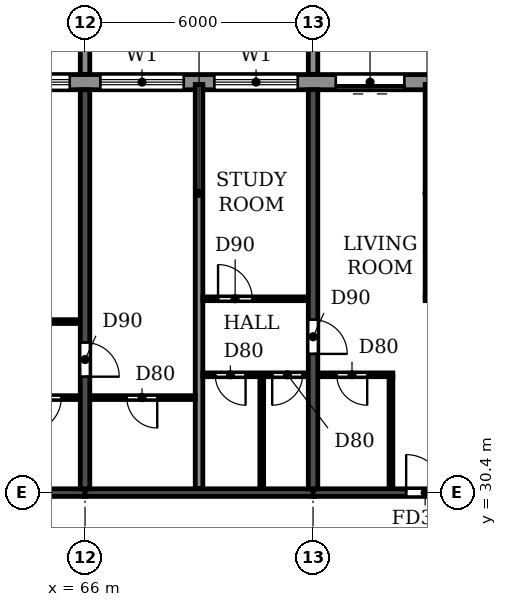
"""IFC4 building model, lengths in metres.
Left out: names, types, materials, properties, quantities, classifications, styles, units other than length and angle.
Written with IfcOpenShell. Run it as: python <this file> out.ifc"""

import sys

from ifc_helpers import new_model, si_unit, direction, frame, frame_2d, origin, place, context, subcontext, project, spatial, polyline, rectangle, outline, extrude, source, transform, mapped, element, fill, save


model = new_model("IFC4")
c1 = context("Model", 3, precision=1e-05, world=origin(), true_north=direction((0.0, 1.0)))
c2 = subcontext(c1, "Body", "Model", "MODEL_VIEW")
j1 = project(units=[si_unit("LENGTHUNIT", "METRE"), si_unit("PLANEANGLEUNIT", "RADIAN")], contexts=[c1])
p1 = place(None, origin())
s1 = spatial("IfcSite", under=j1, at=p1, CompositionType="ELEMENT")
p2 = place(p1, origin())
s2 = spatial("IfcBuilding", under=s1, at=p2, CompositionType="ELEMENT")
p3 = place(p2, frame((0.0, 0.0, 201.6)))
s3 = spatial("IfcBuildingStorey", under=s2, at=p3, CompositionType="ELEMENT", Elevation=201.6)
p4 = place(p3, frame((66.0, 30.5, 0.0), z_axis=(0.0, 0.0, 1.0), x_axis=(0.0, 1.0, 0.0)))
e1 = element("IfcWall", 1, at=p4, inside=s3, PredefinedType="SHEAR", context=c2, shape_type="SweptSolid", body=[
    extrude(rectangle(XDim=10.5, YDim=0.25, at=frame_2d((5.25, 0.0))), origin(), (0.0, 0.0, 1.0), 3.08),
])
p5 = place(p4, frame((2.95, 0.0, 0.0)))
e2 = element("IfcOpeningElement", 2, at=p5, cuts=e1, PredefinedType="OPENING", context=c2, shape_type="SweptSolid", body=[
    extrude(rectangle(XDim=0.9, YDim=2.1, at=frame_2d((0.45, 1.05))), frame((0.0, 0.135, 0.0), z_axis=(0.0, -1.0, 0.0), x_axis=(1.0, 0.0, 0.0)), (0.0, 0.0, 1.0), 0.27),
])
p6 = place(p3, frame((72.0, 30.5, 0.0), z_axis=(0.0, 0.0, 1.0), x_axis=(0.0, 1.0, 0.0)))
e3 = element("IfcWall", 3, at=p6, inside=s3, PredefinedType="SHEAR", context=c2, shape_type="SweptSolid", body=[
    extrude(rectangle(XDim=10.5, YDim=0.25, at=frame_2d((5.25, 0.0))), origin(), (0.0, 0.0, 1.0), 3.08),
])
p7 = place(p6, frame((3.55, 0.0, 0.0)))
e4 = element("IfcOpeningElement", 4, at=p7, cuts=e3, PredefinedType="OPENING", context=c2, shape_type="SweptSolid", body=[
    extrude(rectangle(XDim=0.9, YDim=2.1, at=frame_2d((0.45, 1.05))), frame((0.0, 0.135, 0.0), z_axis=(0.0, -1.0, 0.0), x_axis=(1.0, 0.0, 0.0)), (0.0, 0.0, 1.0), 0.27),
])
p8 = place(p3, frame((60.0, 30.4, 0.0), z_axis=(0.0, 0.0, 1.0), x_axis=(1.0, 0.0, 0.0)))
e5 = element("IfcWall", 5, at=p8, inside=s3, PredefinedType="SHEAR", context=c2, shape_type="SweptSolid", body=[
    extrude(rectangle(XDim=6.0, YDim=0.2, at=frame_2d((3.0, 0.0))), origin(), (0.0, 0.0, 1.0), 2.48),
])
p9 = place(p8, frame((2.45, 0.0, 0.0)))
e6 = element("IfcOpeningElement", 6, at=p9, cuts=e5, PredefinedType="OPENING", context=c2, shape_type="SweptSolid", body=[
    extrude(rectangle(XDim=1.0, YDim=2.1, at=frame_2d((0.5, 1.05))), frame((0.0, 0.11, 0.0), z_axis=(0.0, -1.0, 0.0), x_axis=(1.0, 0.0, 0.0)), (0.0, 0.0, 1.0), 0.22),
])
p10 = place(p3, frame((66.0, 30.4, 0.0), z_axis=(0.0, 0.0, 1.0), x_axis=(1.0, 0.0, 0.0)))
e7 = element("IfcWall", 7, at=p10, inside=s3, PredefinedType="SHEAR", context=c2, shape_type="SweptSolid", body=[
    extrude(rectangle(XDim=6.0, YDim=0.2, at=frame_2d((3.0, 0.0))), origin(), (0.0, 0.0, 1.0), 2.48),
])
p11 = place(p3, frame((72.0, 30.4, 0.0), z_axis=(0.0, 0.0, 1.0), x_axis=(1.0, 0.0, 0.0)))
e8 = element("IfcWall", 8, at=p11, inside=s3, PredefinedType="SHEAR", context=c2, shape_type="SweptSolid", body=[
    extrude(rectangle(XDim=6.0, YDim=0.2, at=frame_2d((3.0, 0.0))), origin(), (0.0, 0.0, 1.0), 2.48),
])
p12 = place(p11, frame((2.45, 0.0, 0.0)))
e9 = element("IfcOpeningElement", 9, at=p12, cuts=e8, PredefinedType="OPENING", context=c2, shape_type="SweptSolid", body=[
    extrude(rectangle(XDim=1.0, YDim=2.1, at=frame_2d((0.5, 1.05))), frame((0.0, 0.11, 0.0), z_axis=(0.0, -1.0, 0.0), x_axis=(1.0, 0.0, 0.0)), (0.0, 0.0, 1.0), 0.22),
])
p13 = place(p3, frame((79.317, 41.2, 0.0), z_axis=(0.0, 0.0, 1.0), x_axis=(-1.0, 0.0, 0.0)))
e10 = element("IfcWall", 10, at=p13, inside=s3, PredefinedType="STANDARD", context=c2, shape_type="SweptSolid", body=[
    extrude(rectangle(XDim=56.634, YDim=0.4, at=frame_2d((28.317, 0.0))), origin(), (0.0, 0.0, 1.0), 3.08),
])
p14 = place(p13, frame((52.717, 0.0, 0.9)))
e11 = element("IfcOpeningElement", 11, at=p14, cuts=e10, PredefinedType="OPENING", context=c2, shape_type="SweptSolid", body=[
    extrude(rectangle(XDim=2.2, YDim=1.5, at=frame_2d((1.1, 0.75))), frame((0.0, 0.21, 0.0), z_axis=(0.0, -1.0, 0.0), x_axis=(1.0, 0.0, 0.0)), (0.0, 0.0, 1.0), 0.42),
])
p15 = place(p13, frame((49.917, 0.0, 0.0)))
e12 = element("IfcOpeningElement", 12, at=p15, cuts=e10, PredefinedType="OPENING", context=c2, shape_type="SweptSolid", body=[
    extrude(rectangle(XDim=1.8, YDim=2.4, at=frame_2d((0.9, 1.2))), frame((0.0, 0.21, 0.0), z_axis=(0.0, -1.0, 0.0), x_axis=(1.0, 0.0, 0.0)), (0.0, 0.0, 1.0), 0.42),
])
p16 = place(p13, frame((46.717, 0.0, 0.9)))
e13 = element("IfcOpeningElement", 13, at=p16, cuts=e10, PredefinedType="OPENING", context=c2, shape_type="SweptSolid", body=[
    extrude(rectangle(XDim=2.2, YDim=1.5, at=frame_2d((1.1, 0.75))), frame((0.0, 0.21, 0.0), z_axis=(0.0, -1.0, 0.0), x_axis=(1.0, 0.0, 0.0)), (0.0, 0.0, 1.0), 0.42),
])
p17 = place(p13, frame((43.917, 0.0, 0.0)))
e14 = element("IfcOpeningElement", 14, at=p17, cuts=e10, PredefinedType="OPENING", context=c2, shape_type="SweptSolid", body=[
    extrude(rectangle(XDim=1.8, YDim=2.4, at=frame_2d((0.9, 1.2))), frame((0.0, 0.21, 0.0), z_axis=(0.0, -1.0, 0.0), x_axis=(1.0, 0.0, 0.0)), (0.0, 0.0, 1.0), 0.42),
])
p18 = place(p13, frame((40.917, 0.0, 0.0)))
e15 = element("IfcOpeningElement", 15, at=p18, cuts=e10, PredefinedType="OPENING", context=c2, shape_type="SweptSolid", body=[
    extrude(rectangle(XDim=1.8, YDim=2.4, at=frame_2d((0.9, 1.2))), frame((0.0, 0.21, 0.0), z_axis=(0.0, -1.0, 0.0), x_axis=(1.0, 0.0, 0.0)), (0.0, 0.0, 1.0), 0.42),
])
p19 = place(p13, frame((37.717, 0.0, 0.9)))
e16 = element("IfcOpeningElement", 16, at=p19, cuts=e10, PredefinedType="OPENING", context=c2, shape_type="SweptSolid", body=[
    extrude(rectangle(XDim=2.2, YDim=1.5, at=frame_2d((1.1, 0.75))), frame((0.0, 0.21, 0.0), z_axis=(0.0, -1.0, 0.0), x_axis=(1.0, 0.0, 0.0)), (0.0, 0.0, 1.0), 0.42),
])
p20 = place(p13, frame((34.717, 0.0, 0.9)))
e17 = element("IfcOpeningElement", 17, at=p20, cuts=e10, PredefinedType="OPENING", context=c2, shape_type="SweptSolid", body=[
    extrude(rectangle(XDim=2.2, YDim=1.5, at=frame_2d((1.1, 0.75))), frame((0.0, 0.21, 0.0), z_axis=(0.0, -1.0, 0.0), x_axis=(1.0, 0.0, 0.0)), (0.0, 0.0, 1.0), 0.42),
])
p21 = place(p13, frame((31.717, 0.0, 0.9)))
e18 = element("IfcOpeningElement", 18, at=p21, cuts=e10, PredefinedType="OPENING", context=c2, shape_type="SweptSolid", body=[
    extrude(rectangle(XDim=2.2, YDim=1.5, at=frame_2d((1.1, 0.75))), frame((0.0, 0.21, 0.0), z_axis=(0.0, -1.0, 0.0), x_axis=(1.0, 0.0, 0.0)), (0.0, 0.0, 1.0), 0.42),
])
p22 = place(p13, frame((28.717, 0.0, 0.9)))
e19 = element("IfcOpeningElement", 19, at=p22, cuts=e10, PredefinedType="OPENING", context=c2, shape_type="SweptSolid", body=[
    extrude(rectangle(XDim=2.2, YDim=1.5, at=frame_2d((1.1, 0.75))), frame((0.0, 0.21, 0.0), z_axis=(0.0, -1.0, 0.0), x_axis=(1.0, 0.0, 0.0)), (0.0, 0.0, 1.0), 0.42),
])
p23 = place(p13, frame((25.917, 0.0, 0.0)))
e20 = element("IfcOpeningElement", 20, at=p23, cuts=e10, PredefinedType="OPENING", context=c2, shape_type="SweptSolid", body=[
    extrude(rectangle(XDim=1.8, YDim=2.4, at=frame_2d((0.9, 1.2))), frame((0.0, 0.21, 0.0), z_axis=(0.0, -1.0, 0.0), x_axis=(1.0, 0.0, 0.0)), (0.0, 0.0, 1.0), 0.42),
])
p24 = place(p13, frame((22.717, 0.0, 0.9)))
e21 = element("IfcOpeningElement", 21, at=p24, cuts=e10, PredefinedType="OPENING", context=c2, shape_type="SweptSolid", body=[
    extrude(rectangle(XDim=2.2, YDim=1.5, at=frame_2d((1.1, 0.75))), frame((0.0, 0.21, 0.0), z_axis=(0.0, -1.0, 0.0), x_axis=(1.0, 0.0, 0.0)), (0.0, 0.0, 1.0), 0.42),
])
p25 = place(p13, frame((19.717, 0.0, 0.9)))
e22 = element("IfcOpeningElement", 22, at=p25, cuts=e10, PredefinedType="OPENING", context=c2, shape_type="SweptSolid", body=[
    extrude(rectangle(XDim=2.2, YDim=1.5, at=frame_2d((1.1, 0.75))), frame((0.0, 0.21, 0.0), z_axis=(0.0, -1.0, 0.0), x_axis=(1.0, 0.0, 0.0)), (0.0, 0.0, 1.0), 0.42),
])
p26 = place(p13, frame((16.917, 0.0, 0.0)))
e23 = element("IfcOpeningElement", 23, at=p26, cuts=e10, PredefinedType="OPENING", context=c2, shape_type="SweptSolid", body=[
    extrude(rectangle(XDim=1.8, YDim=2.4, at=frame_2d((0.9, 1.2))), frame((0.0, 0.21, 0.0), z_axis=(0.0, -1.0, 0.0), x_axis=(1.0, 0.0, 0.0)), (0.0, 0.0, 1.0), 0.42),
])
p27 = place(p13, frame((13.717, 0.0, 0.9)))
e24 = element("IfcOpeningElement", 24, at=p27, cuts=e10, PredefinedType="OPENING", context=c2, shape_type="SweptSolid", body=[
    extrude(rectangle(XDim=2.2, YDim=1.5, at=frame_2d((1.1, 0.75))), frame((0.0, 0.21, 0.0), z_axis=(0.0, -1.0, 0.0), x_axis=(1.0, 0.0, 0.0)), (0.0, 0.0, 1.0), 0.42),
])
p28 = place(p13, frame((10.717, 0.0, 0.9)))
e25 = element("IfcOpeningElement", 25, at=p28, cuts=e10, PredefinedType="OPENING", context=c2, shape_type="SweptSolid", body=[
    extrude(rectangle(XDim=2.2, YDim=1.5, at=frame_2d((1.1, 0.75))), frame((0.0, 0.21, 0.0), z_axis=(0.0, -1.0, 0.0), x_axis=(1.0, 0.0, 0.0)), (0.0, 0.0, 1.0), 0.42),
])
p29 = place(p13, frame((7.717, 0.0, 0.9)))
e26 = element("IfcOpeningElement", 26, at=p29, cuts=e10, PredefinedType="OPENING", context=c2, shape_type="SweptSolid", body=[
    extrude(rectangle(XDim=2.2, YDim=1.5, at=frame_2d((1.1, 0.75))), frame((0.0, 0.21, 0.0), z_axis=(0.0, -1.0, 0.0), x_axis=(1.0, 0.0, 0.0)), (0.0, 0.0, 1.0), 0.42),
])
p30 = place(p13, frame((4.917, 0.0, 0.0)))
e27 = element("IfcOpeningElement", 27, at=p30, cuts=e10, PredefinedType="OPENING", context=c2, shape_type="SweptSolid", body=[
    extrude(rectangle(XDim=1.8, YDim=2.4, at=frame_2d((0.9, 1.2))), frame((0.0, 0.21, 0.0), z_axis=(0.0, -1.0, 0.0), x_axis=(1.0, 0.0, 0.0)), (0.0, 0.0, 1.0), 0.42),
])
p31 = place(p13, frame((1.717, 0.0, 0.9)))
e28 = element("IfcOpeningElement", 28, at=p31, cuts=e10, PredefinedType="OPENING", context=c2, shape_type="SweptSolid", body=[
    extrude(rectangle(XDim=2.2, YDim=1.5, at=frame_2d((1.1, 0.75))), frame((0.0, 0.21, 0.0), z_axis=(0.0, -1.0, 0.0), x_axis=(1.0, 0.0, 0.0)), (0.0, 0.0, 1.0), 0.42),
])
m1 = source(origin(), c2, "Body", "SweptSolid", [
    extrude(outline(polyline([(0.0, 0.0), (0.25, 0.0), (0.25, 3.1), (0.0, 3.1), (0.0, 0.0)])), origin(), (0.0, 0.0, 1.0), 3.1),
])
for number, where in (
    (29, (65.875, 41.4, 0.0)),
    (30, (71.875, 41.4, 0.0)),
):
    element("IfcWall", number, at=place(p3, frame(where)), inside=s3, PredefinedType="STANDARD", context=c2, shape_type="MappedRepresentation", body=[
        mapped(m1, transform((0.0, 0.0, 0.0))),
    ])
p32 = place(p3, frame((69.0, 30.51, 0.0), z_axis=(0.0, 0.0, 1.0), x_axis=(0.0, 1.0, 0.0)))
e31 = element("IfcWall", 31, at=p32, inside=s3, PredefinedType="PARTITIONING", context=c2, shape_type="SweptSolid", body=[
    extrude(rectangle(XDim=10.63, YDim=0.2, at=frame_2d((5.315, 0.0))), origin(), (0.0, 0.0, 1.0), 3.08),
])
p33 = place(p3, frame((63.8, 32.9, 0.0), z_axis=(0.0, 0.0, 1.0), x_axis=(1.0, 0.0, 0.0)))
e32 = element("IfcWall", 32, at=p33, inside=s3, PredefinedType="PARTITIONING", context=c2, shape_type="SweptSolid", body=[
    extrude(rectangle(XDim=2.065, YDim=0.1, at=frame_2d((1.032, 0.0))), origin(), (0.0, 0.0, 1.0), 3.08),
])
p34 = place(p33, frame((0.675, 0.0, 0.0)))
e33 = element("IfcOpeningElement", 33, at=p34, cuts=e32, PredefinedType="OPENING", context=c2, shape_type="SweptSolid", body=[
    extrude(rectangle(XDim=0.9, YDim=2.1, at=frame_2d((0.45, 1.05))), frame((0.0, 0.06, 0.0), z_axis=(0.0, -1.0, 0.0), x_axis=(1.0, 0.0, 0.0)), (0.0, 0.0, 1.0), 0.12),
])
p35 = place(p3, frame((66.135, 32.9, 0.0), z_axis=(0.0, 0.0, 1.0), x_axis=(1.0, 0.0, 0.0)))
e34 = element("IfcWall", 34, at=p35, inside=s3, PredefinedType="PARTITIONING", context=c2, shape_type="SweptSolid", body=[
    extrude(rectangle(XDim=2.765, YDim=0.1, at=frame_2d((1.382, 0.0))), origin(), (0.0, 0.0, 1.0), 3.08),
])
p36 = place(p35, frame((0.965, 0.0, 0.0)))
e35 = element("IfcOpeningElement", 35, at=p36, cuts=e34, PredefinedType="OPENING", context=c2, shape_type="SweptSolid", body=[
    extrude(rectangle(XDim=0.8, YDim=2.1, at=frame_2d((0.4, 1.05))), frame((0.0, 0.06, 0.0), z_axis=(0.0, -1.0, 0.0), x_axis=(1.0, 0.0, 0.0)), (0.0, 0.0, 1.0), 0.12),
])
p37 = place(p3, frame((69.1, 33.5, 0.0), z_axis=(0.0, 0.0, 1.0), x_axis=(1.0, 0.0, 0.0)))
e36 = element("IfcWall", 36, at=p37, inside=s3, PredefinedType="PARTITIONING", context=c2, shape_type="SweptSolid", body=[
    extrude(rectangle(XDim=2.765, YDim=0.1, at=frame_2d((1.382, 0.0))), origin(), (0.0, 0.0, 1.0), 3.08),
])
p38 = place(p37, frame((0.325, 0.0, 0.0)))
e37 = element("IfcOpeningElement", 37, at=p38, cuts=e36, PredefinedType="OPENING", context=c2, shape_type="SweptSolid", body=[
    extrude(rectangle(XDim=0.8, YDim=2.1, at=frame_2d((0.4, 1.05))), frame((0.0, 0.06, 0.0), z_axis=(0.0, -1.0, 0.0), x_axis=(1.0, 0.0, 0.0)), (0.0, 0.0, 1.0), 0.12),
])
p39 = place(p37, frame((1.825, 0.0, 0.0)))
e38 = element("IfcOpeningElement", 38, at=p39, cuts=e36, PredefinedType="OPENING", context=c2, shape_type="SweptSolid", body=[
    extrude(rectangle(XDim=0.8, YDim=2.1, at=frame_2d((0.4, 1.05))), frame((0.0, 0.06, 0.0), z_axis=(0.0, -1.0, 0.0), x_axis=(1.0, 0.0, 0.0)), (0.0, 0.0, 1.0), 0.12),
])
p40 = place(p3, frame((72.135, 33.5, 0.0), z_axis=(0.0, 0.0, 1.0), x_axis=(1.0, 0.0, 0.0)))
e39 = element("IfcWall", 39, at=p40, inside=s3, PredefinedType="PARTITIONING", context=c2, shape_type="SweptSolid", body=[
    extrude(rectangle(XDim=1.965, YDim=0.1, at=frame_2d((0.982, 0.0))), origin(), (0.0, 0.0, 1.0), 3.08),
])
p41 = place(p40, frame((0.49, 0.0, 0.0)))
e40 = element("IfcOpeningElement", 40, at=p41, cuts=e39, PredefinedType="OPENING", context=c2, shape_type="SweptSolid", body=[
    extrude(rectangle(XDim=0.8, YDim=2.1, at=frame_2d((0.4, 1.05))), frame((0.0, 0.06, 0.0), z_axis=(0.0, -1.0, 0.0), x_axis=(1.0, 0.0, 0.0)), (0.0, 0.0, 1.0), 0.12),
])
p42 = place(p3, frame((62.95, 34.9, 0.0), z_axis=(0.0, 0.0, 1.0), x_axis=(1.0, 0.0, 0.0)))
e41 = element("IfcWall", 41, at=p42, inside=s3, PredefinedType="PARTITIONING", context=c2, shape_type="SweptSolid", body=[
    extrude(rectangle(XDim=2.915, YDim=0.1, at=frame_2d((1.458, 0.0))), origin(), (0.0, 0.0, 1.0), 3.08),
])
p43 = place(p42, frame((0.55, 0.0, 0.0)))
e42 = element("IfcOpeningElement", 42, at=p43, cuts=e41, PredefinedType="OPENING", context=c2, shape_type="SweptSolid", body=[
    extrude(rectangle(XDim=0.9, YDim=2.1, at=frame_2d((0.45, 1.05))), frame((0.0, 0.06, 0.0), z_axis=(0.0, -1.0, 0.0), x_axis=(1.0, 0.0, 0.0)), (0.0, 0.0, 1.0), 0.12),
])
p44 = place(p3, frame((69.1, 35.5, 0.0), z_axis=(0.0, 0.0, 1.0), x_axis=(1.0, 0.0, 0.0)))
e43 = element("IfcWall", 43, at=p44, inside=s3, PredefinedType="PARTITIONING", context=c2, shape_type="SweptSolid", body=[
    extrude(rectangle(XDim=2.765, YDim=0.1, at=frame_2d((1.382, 0.0))), origin(), (0.0, 0.0, 1.0), 3.08),
])
p45 = place(p44, frame((0.4, 0.0, 0.0)))
e44 = element("IfcOpeningElement", 44, at=p45, cuts=e43, PredefinedType="OPENING", context=c2, shape_type="SweptSolid", body=[
    extrude(rectangle(XDim=0.9, YDim=2.1, at=frame_2d((0.45, 1.05))), frame((0.0, 0.06, 0.0), z_axis=(0.0, -1.0, 0.0), x_axis=(1.0, 0.0, 0.0)), (0.0, 0.0, 1.0), 0.12),
])
p46 = place(p3, frame((74.95, 35.5, 0.0), z_axis=(0.0, 0.0, 1.0), x_axis=(1.0, 0.0, 0.0)))
e45 = element("IfcWall", 45, at=p46, inside=s3, PredefinedType="PARTITIONING", context=c2, shape_type="SweptSolid", body=[
    extrude(rectangle(XDim=2.915, YDim=0.1, at=frame_2d((1.458, 0.0))), origin(), (0.0, 0.0, 1.0), 3.08),
])
p47 = place(p46, frame((0.55, 0.0, 0.0)))
e46 = element("IfcOpeningElement", 46, at=p47, cuts=e45, PredefinedType="OPENING", context=c2, shape_type="SweptSolid", body=[
    extrude(rectangle(XDim=0.9, YDim=2.1, at=frame_2d((0.45, 1.05))), frame((0.0, 0.06, 0.0), z_axis=(0.0, -1.0, 0.0), x_axis=(1.0, 0.0, 0.0)), (0.0, 0.0, 1.0), 0.12),
])
for number, where, z_axis, x_axis in (
    (47, (70.65, 30.51, 0.0), (0.0, 0.0, 1.0), (0.0, 1.0, 0.0)),
    (48, (74.05, 30.51, 0.0), (0.0, 0.0, 1.0), (0.0, 1.0, 0.0)),
):
    element("IfcWall", number, at=place(p3, frame(where, z_axis=z_axis, x_axis=x_axis)), inside=s3, PredefinedType="PARTITIONING", context=c2, shape_type="SweptSolid", body=[
        extrude(rectangle(XDim=2.94, YDim=0.1, at=frame_2d((1.47, 0.0))), origin(), (0.0, 0.0, 1.0), 3.08),
    ])
p48 = place(p3, frame((75.0, 35.55, 0.0), z_axis=(0.0, 0.0, 1.0), x_axis=(0.0, 1.0, 0.0)))
e49 = element("IfcWall", 49, at=p48, inside=s3, PredefinedType="PARTITIONING", context=c2, shape_type="SweptSolid", body=[
    extrude(rectangle(XDim=5.59, YDim=0.1, at=frame_2d((2.795, 0.0))), origin(), (0.0, 0.0, 1.0), 3.08),
])
p49 = place(p27, origin())
e50 = element("IfcWindow", 50, at=p49, inside=s3, PartitioningType="DOUBLE_PANEL_HORIZONTAL", PredefinedType="WINDOW", context=c2, shape_type="SweptSolid", body=[
    extrude(rectangle(XDim=2.2, YDim=1.5, at=frame_2d((1.1, 0.75))), frame((0.0, 0.03, 0.0), z_axis=(0.0, -1.0, 0.0), x_axis=(1.0, 0.0, 0.0)), (0.0, 0.0, 1.0), 0.06),
])
fill(e24, e50)
p50 = place(p28, origin())
e51 = element("IfcWindow", 51, at=p50, inside=s3, PartitioningType="DOUBLE_PANEL_HORIZONTAL", PredefinedType="WINDOW", context=c2, shape_type="SweptSolid", body=[
    extrude(rectangle(XDim=2.2, YDim=1.5, at=frame_2d((1.1, 0.75))), frame((0.0, 0.03, 0.0), z_axis=(0.0, -1.0, 0.0), x_axis=(1.0, 0.0, 0.0)), (0.0, 0.0, 1.0), 0.06),
])
fill(e25, e51)
p51 = place(p29, origin())
e52 = element("IfcWindow", 52, at=p51, inside=s3, PartitioningType="DOUBLE_PANEL_HORIZONTAL", PredefinedType="WINDOW", context=c2, shape_type="SweptSolid", body=[
    extrude(rectangle(XDim=2.2, YDim=1.5, at=frame_2d((1.1, 0.75))), frame((0.0, 0.03, 0.0), z_axis=(0.0, -1.0, 0.0), x_axis=(1.0, 0.0, 0.0)), (0.0, 0.0, 1.0), 0.06),
])
fill(e26, e52)
p52 = place(p30, origin())
e53 = element("IfcDoor", 53, at=p52, inside=s3, OperationType="DOUBLE_DOOR_SLIDING", PredefinedType="DOOR", context=c2, shape_type="SweptSolid", body=[
    extrude(rectangle(XDim=1.8, YDim=2.4, at=frame_2d((0.9, 1.2))), frame((0.0, 0.025, 0.0), z_axis=(0.0, -1.0, 0.0), x_axis=(1.0, 0.0, 0.0)), (0.0, 0.0, 1.0), 0.05),
])
fill(e27, e53)
p53 = place(p36, frame((0.8, 0.0, 0.0), z_axis=(0.0, 0.0, 1.0), x_axis=(-1.0, 0.0, 0.0)))
e54 = element("IfcDoor", 54, at=p53, inside=s3, OperationType="SINGLE_SWING_LEFT", PredefinedType="DOOR", context=c2, shape_type="SweptSolid", body=[
    extrude(rectangle(XDim=0.8, YDim=2.1, at=frame_2d((0.4, 1.05))), frame((0.0, 0.025, 0.0), z_axis=(0.0, -1.0, 0.0), x_axis=(1.0, 0.0, 0.0)), (0.0, 0.0, 1.0), 0.05),
])
fill(e35, e54)
p54 = place(p34, frame((0.9, 0.0, 0.0), z_axis=(0.0, 0.0, 1.0), x_axis=(-1.0, 0.0, 0.0)))
e55 = element("IfcDoor", 55, at=p54, inside=s3, OperationType="SINGLE_SWING_RIGHT", PredefinedType="DOOR", context=c2, shape_type="SweptSolid", body=[
    extrude(rectangle(XDim=0.9, YDim=2.1, at=frame_2d((0.45, 1.05))), frame((0.0, 0.025, 0.0), z_axis=(0.0, -1.0, 0.0), x_axis=(1.0, 0.0, 0.0)), (0.0, 0.0, 1.0), 0.05),
])
fill(e33, e55)
p55 = place(p5, frame((0.9, 0.0, 0.0), z_axis=(0.0, 0.0, 1.0), x_axis=(-1.0, 0.0, 0.0)))
e56 = element("IfcDoor", 56, at=p55, inside=s3, OperationType="SINGLE_SWING_RIGHT", PredefinedType="DOOR", context=c2, shape_type="SweptSolid", body=[
    extrude(rectangle(XDim=0.9, YDim=2.1, at=frame_2d((0.45, 1.05))), frame((0.0, 0.025, 0.0), z_axis=(0.0, -1.0, 0.0), x_axis=(1.0, 0.0, 0.0)), (0.0, 0.0, 1.0), 0.05),
])
fill(e2, e56)
p56 = place(p38, frame((0.8, 0.0, 0.0), z_axis=(0.0, 0.0, 1.0), x_axis=(-1.0, 0.0, 0.0)))
e57 = element("IfcDoor", 57, at=p56, inside=s3, OperationType="SINGLE_SWING_LEFT", PredefinedType="DOOR", context=c2, shape_type="SweptSolid", body=[
    extrude(rectangle(XDim=0.8, YDim=2.1, at=frame_2d((0.4, 1.05))), frame((0.0, 0.025, 0.0), z_axis=(0.0, -1.0, 0.0), x_axis=(1.0, 0.0, 0.0)), (0.0, 0.0, 1.0), 0.05),
])
fill(e37, e57)
p57 = place(p45, origin())
e58 = element("IfcDoor", 58, at=p57, inside=s3, OperationType="SINGLE_SWING_LEFT", PredefinedType="DOOR", context=c2, shape_type="SweptSolid", body=[
    extrude(rectangle(XDim=0.9, YDim=2.1, at=frame_2d((0.45, 1.05))), frame((0.0, 0.025, 0.0), z_axis=(0.0, -1.0, 0.0), x_axis=(1.0, 0.0, 0.0)), (0.0, 0.0, 1.0), 0.05),
])
fill(e44, e58)
p58 = place(p39, frame((0.8, 0.0, 0.0), z_axis=(0.0, 0.0, 1.0), x_axis=(-1.0, 0.0, 0.0)))
e59 = element("IfcDoor", 59, at=p58, inside=s3, OperationType="SINGLE_SWING_RIGHT", PredefinedType="DOOR", context=c2, shape_type="SweptSolid", body=[
    extrude(rectangle(XDim=0.8, YDim=2.1, at=frame_2d((0.4, 1.05))), frame((0.0, 0.025, 0.0), z_axis=(0.0, -1.0, 0.0), x_axis=(1.0, 0.0, 0.0)), (0.0, 0.0, 1.0), 0.05),
])
fill(e38, e59)
p59 = place(p7, frame((0.9, 0.0, 0.0), z_axis=(0.0, 0.0, 1.0), x_axis=(-1.0, 0.0, 0.0)))
e60 = element("IfcDoor", 60, at=p59, inside=s3, OperationType="SINGLE_SWING_RIGHT", PredefinedType="DOOR", context=c2, shape_type="SweptSolid", body=[
    extrude(rectangle(XDim=0.9, YDim=2.1, at=frame_2d((0.45, 1.05))), frame((0.0, 0.025, 0.0), z_axis=(0.0, -1.0, 0.0), x_axis=(1.0, 0.0, 0.0)), (0.0, 0.0, 1.0), 0.05),
])
fill(e4, e60)
p60 = place(p41, frame((0.8, 0.0, 0.0), z_axis=(0.0, 0.0, 1.0), x_axis=(-1.0, 0.0, 0.0)))
e61 = element("IfcDoor", 61, at=p60, inside=s3, OperationType="SINGLE_SWING_LEFT", PredefinedType="DOOR", context=c2, shape_type="SweptSolid", body=[
    extrude(rectangle(XDim=0.8, YDim=2.1, at=frame_2d((0.4, 1.05))), frame((0.0, 0.025, 0.0), z_axis=(0.0, -1.0, 0.0), x_axis=(1.0, 0.0, 0.0)), (0.0, 0.0, 1.0), 0.05),
])
fill(e40, e61)
p61 = place(p12, origin())
e62 = element("IfcDoor", 62, at=p61, inside=s3, OperationType="SINGLE_SWING_LEFT", PredefinedType="DOOR", context=c2, shape_type="SweptSolid", body=[
    extrude(rectangle(XDim=1.0, YDim=2.1, at=frame_2d((0.5, 1.05))), frame((0.0, 0.025, 0.0), z_axis=(0.0, -1.0, 0.0), x_axis=(1.0, 0.0, 0.0)), (0.0, 0.0, 1.0), 0.05),
])
fill(e9, e62)
save(model, sys.argv[1])
